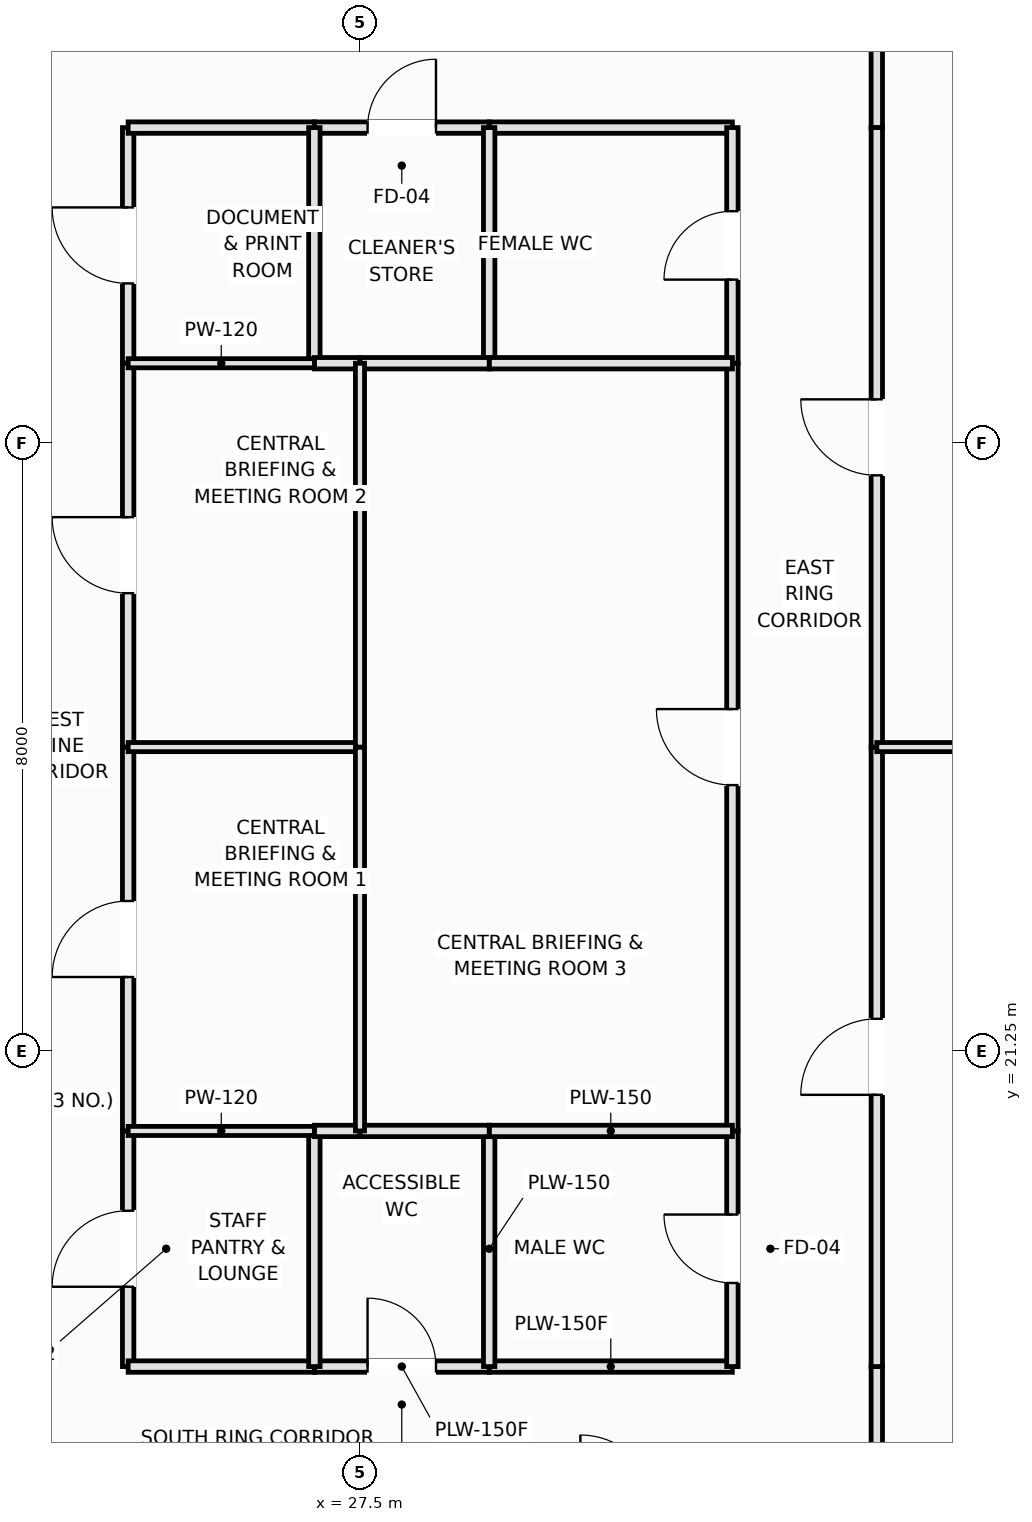
"""IFC4 building model, lengths in metres.
Left out: names, types, materials, properties, quantities, classifications, styles, units other than length and angle.
Written with IfcOpenShell. Run it as: python <this file> out.ifc"""

import sys

from ifc_helpers import new_model, si_unit, direction, frame, frame_2d, origin, place, context, subcontext, project, spatial, rectangle, extrude, element, fill, save


model = new_model("IFC4")
c1 = context("Model", 3, precision=1e-05, world=origin(), true_north=direction((0.0, 1.0)))
c2 = subcontext(c1, "Body", "Model", "MODEL_VIEW")
j1 = project(units=[si_unit("LENGTHUNIT", "METRE"), si_unit("PLANEANGLEUNIT", "RADIAN")], contexts=[c1])
p1 = place(None, origin())
s1 = spatial("IfcSite", under=j1, at=p1, CompositionType="ELEMENT")
p2 = place(p1, origin())
s2 = spatial("IfcBuilding", under=s1, at=p2, CompositionType="ELEMENT")
p3 = place(p2, frame((0.0, 0.0, 39.8)))
s3 = spatial("IfcBuildingStorey", under=s2, at=p3, CompositionType="ELEMENT", Elevation=39.8)
p4 = place(p3, frame((24.45, 17.1, 0.0), z_axis=(0.0, 0.0, 1.0), x_axis=(0.0, 1.0, 0.0)))
e1 = element("IfcWall", 1, at=p4, inside=s3, PredefinedType="PARTITIONING", context=c2, shape_type="SweptSolid", body=[
    extrude(rectangle(XDim=3.1, YDim=0.15, at=frame_2d((1.55, 0.0))), origin(), (0.0, 0.0, 1.0), 3.37),
])
p5 = place(p4, frame((1.05, 0.0, 0.0)))
e2 = element("IfcOpeningElement", 2, at=p5, cuts=e1, PredefinedType="OPENING", context=c2, shape_type="SweptSolid", body=[
    extrude(rectangle(XDim=1.0, YDim=2.15, at=frame_2d((0.5, 1.075))), frame((0.0, 0.085, 0.0), z_axis=(0.0, -1.0, 0.0), x_axis=(1.0, 0.0, 0.0)), (0.0, 0.0, 1.0), 0.17),
])
p6 = place(p3, frame((24.45, 30.3, 0.0), z_axis=(0.0, 0.0, 1.0), x_axis=(0.0, 1.0, 0.0)))
e3 = element("IfcWall", 3, at=p6, inside=s3, PredefinedType="PARTITIONING", context=c2, shape_type="SweptSolid", body=[
    extrude(rectangle(XDim=3.1, YDim=0.15, at=frame_2d((1.55, 0.0))), origin(), (0.0, 0.0, 1.0), 3.37),
])
p7 = place(p6, frame((1.05, 0.0, 0.0)))
e4 = element("IfcOpeningElement", 4, at=p7, cuts=e3, PredefinedType="OPENING", context=c2, shape_type="SweptSolid", body=[
    extrude(rectangle(XDim=1.0, YDim=2.15, at=frame_2d((0.5, 1.075))), frame((0.0, 0.085, 0.0), z_axis=(0.0, -1.0, 0.0), x_axis=(1.0, 0.0, 0.0)), (0.0, 0.0, 1.0), 0.17),
])
p8 = place(p3, frame((24.45, 20.2, 0.0), z_axis=(0.0, 0.0, 1.0), x_axis=(0.0, 1.0, 0.0)))
e5 = element("IfcWall", 5, at=p8, inside=s3, PredefinedType="PARTITIONING", context=c2, shape_type="SweptSolid", body=[
    extrude(rectangle(XDim=5.05, YDim=0.15, at=frame_2d((2.525, 0.0))), origin(), (0.0, 0.0, 1.0), 3.37),
])
p9 = place(p8, frame((2.025, 0.0, 0.0)))
e6 = element("IfcOpeningElement", 6, at=p9, cuts=e5, PredefinedType="OPENING", context=c2, shape_type="SweptSolid", body=[
    extrude(rectangle(XDim=1.0, YDim=2.15, at=frame_2d((0.5, 1.075))), frame((0.0, 0.085, 0.0), z_axis=(0.0, -1.0, 0.0), x_axis=(1.0, 0.0, 0.0)), (0.0, 0.0, 1.0), 0.17),
])
p10 = place(p3, frame((24.45, 25.25, 0.0), z_axis=(0.0, 0.0, 1.0), x_axis=(0.0, 1.0, 0.0)))
e7 = element("IfcWall", 7, at=p10, inside=s3, PredefinedType="PARTITIONING", context=c2, shape_type="SweptSolid", body=[
    extrude(rectangle(XDim=5.05, YDim=0.15, at=frame_2d((2.525, 0.0))), origin(), (0.0, 0.0, 1.0), 3.37),
])
p11 = place(p10, frame((2.025, 0.0, 0.0)))
e8 = element("IfcOpeningElement", 8, at=p11, cuts=e7, PredefinedType="OPENING", context=c2, shape_type="SweptSolid", body=[
    extrude(rectangle(XDim=1.0, YDim=2.15, at=frame_2d((0.5, 1.075))), frame((0.0, 0.085, 0.0), z_axis=(0.0, -1.0, 0.0), x_axis=(1.0, 0.0, 0.0)), (0.0, 0.0, 1.0), 0.17),
])
p12 = place(p3, frame((29.2, 17.1, 0.0), z_axis=(0.0, 0.0, 1.0), x_axis=(1.0, 0.0, 0.0)))
e9 = element("IfcWall", 9, at=p12, inside=s3, PredefinedType="PLUMBINGWALL", context=c2, shape_type="SweptSolid", body=[
    extrude(rectangle(XDim=3.2, YDim=0.15, at=frame_2d((1.6, 0.0))), origin(), (0.0, 0.0, 1.0), 3.37),
])
p13 = place(p3, frame((26.9, 17.1, 0.0), z_axis=(0.0, 0.0, 1.0), x_axis=(1.0, 0.0, 0.0)))
e10 = element("IfcWall", 10, at=p13, inside=s3, PredefinedType="PLUMBINGWALL", context=c2, shape_type="SweptSolid", body=[
    extrude(rectangle(XDim=2.3, YDim=0.15, at=frame_2d((1.15, 0.0))), origin(), (0.0, 0.0, 1.0), 3.37),
])
p14 = place(p13, frame((0.7, 0.0, 0.0)))
e11 = element("IfcOpeningElement", 11, at=p14, cuts=e10, PredefinedType="OPENING", context=c2, shape_type="SweptSolid", body=[
    extrude(rectangle(XDim=0.9, YDim=2.1, at=frame_2d((0.45, 1.05))), frame((0.0, 0.085, 0.0), z_axis=(0.0, -1.0, 0.0), x_axis=(1.0, 0.0, 0.0)), (0.0, 0.0, 1.0), 0.17),
])
p15 = place(p3, frame((24.45, 17.1, 0.0), z_axis=(0.0, 0.0, 1.0), x_axis=(1.0, 0.0, 0.0)))
e12 = element("IfcWall", 12, at=p15, inside=s3, PredefinedType="PARTITIONING", context=c2, shape_type="SweptSolid", body=[
    extrude(rectangle(XDim=2.45, YDim=0.15, at=frame_2d((1.225, 0.0))), origin(), (0.0, 0.0, 1.0), 3.37),
])
p16 = place(p3, frame((34.3, 15.2, 0.0), z_axis=(0.0, 0.0, 1.0), x_axis=(0.0, 1.0, 0.0)))
e13 = element("IfcWall", 13, at=p16, inside=s3, PredefinedType="PARTITIONING", context=c2, shape_type="SweptSolid", body=[
    extrude(rectangle(XDim=1.9, YDim=0.15, at=frame_2d((0.95, 0.0))), origin(), (0.0, 0.0, 1.0), 3.37),
])
p17 = place(p3, frame((29.2, 33.4, 0.0), z_axis=(0.0, 0.0, 1.0), x_axis=(1.0, 0.0, 0.0)))
e14 = element("IfcWall", 14, at=p17, inside=s3, PredefinedType="PLUMBINGWALL", context=c2, shape_type="SweptSolid", body=[
    extrude(rectangle(XDim=3.2, YDim=0.15, at=frame_2d((1.6, 0.0))), origin(), (0.0, 0.0, 1.0), 3.37),
])
p18 = place(p3, frame((26.9, 33.4, 0.0), z_axis=(0.0, 0.0, 1.0), x_axis=(1.0, 0.0, 0.0)))
e15 = element("IfcWall", 15, at=p18, inside=s3, PredefinedType="PLUMBINGWALL", context=c2, shape_type="SweptSolid", body=[
    extrude(rectangle(XDim=2.3, YDim=0.15, at=frame_2d((1.15, 0.0))), origin(), (0.0, 0.0, 1.0), 3.37),
])
p19 = place(p18, frame((0.7, 0.0, 0.0)))
e16 = element("IfcOpeningElement", 16, at=p19, cuts=e15, PredefinedType="OPENING", context=c2, shape_type="SweptSolid", body=[
    extrude(rectangle(XDim=0.9, YDim=2.1, at=frame_2d((0.45, 1.05))), frame((0.0, 0.085, 0.0), z_axis=(0.0, -1.0, 0.0), x_axis=(1.0, 0.0, 0.0)), (0.0, 0.0, 1.0), 0.17),
])
p20 = place(p3, frame((24.45, 33.4, 0.0), z_axis=(0.0, 0.0, 1.0), x_axis=(1.0, 0.0, 0.0)))
e17 = element("IfcWall", 17, at=p20, inside=s3, PredefinedType="PARTITIONING", context=c2, shape_type="SweptSolid", body=[
    extrude(rectangle(XDim=2.45, YDim=0.15, at=frame_2d((1.225, 0.0))), origin(), (0.0, 0.0, 1.0), 3.37),
])
p21 = place(p3, frame((34.3, 33.4, 0.0), z_axis=(0.0, 0.0, 1.0), x_axis=(0.0, 1.0, 0.0)))
e18 = element("IfcWall", 18, at=p21, inside=s3, PredefinedType="PARTITIONING", context=c2, shape_type="SweptSolid", body=[
    extrude(rectangle(XDim=1.9, YDim=0.15, at=frame_2d((0.95, 0.0))), origin(), (0.0, 0.0, 1.0), 3.37),
])
p22 = place(p3, frame((32.4, 17.1, 0.0), z_axis=(0.0, 0.0, 1.0), x_axis=(0.0, 1.0, 0.0)))
e19 = element("IfcWall", 19, at=p22, inside=s3, PredefinedType="PLUMBINGWALL", context=c2, shape_type="SweptSolid", body=[
    extrude(rectangle(XDim=3.1, YDim=0.15, at=frame_2d((1.55, 0.0))), origin(), (0.0, 0.0, 1.0), 3.37),
])
p23 = place(p22, frame((1.1, 0.0, 0.0)))
e20 = element("IfcOpeningElement", 20, at=p23, cuts=e19, PredefinedType="OPENING", context=c2, shape_type="SweptSolid", body=[
    extrude(rectangle(XDim=0.9, YDim=2.1, at=frame_2d((0.45, 1.05))), frame((0.0, 0.085, 0.0), z_axis=(0.0, -1.0, 0.0), x_axis=(1.0, 0.0, 0.0)), (0.0, 0.0, 1.0), 0.17),
])
p24 = place(p3, frame((32.4, 30.3, 0.0), z_axis=(0.0, 0.0, 1.0), x_axis=(0.0, 1.0, 0.0)))
e21 = element("IfcWall", 21, at=p24, inside=s3, PredefinedType="PLUMBINGWALL", context=c2, shape_type="SweptSolid", body=[
    extrude(rectangle(XDim=3.1, YDim=0.15, at=frame_2d((1.55, 0.0))), origin(), (0.0, 0.0, 1.0), 3.37),
])
p25 = place(p24, frame((1.1, 0.0, 0.0)))
e22 = element("IfcOpeningElement", 22, at=p25, cuts=e21, PredefinedType="OPENING", context=c2, shape_type="SweptSolid", body=[
    extrude(rectangle(XDim=0.9, YDim=2.1, at=frame_2d((0.45, 1.05))), frame((0.0, 0.085, 0.0), z_axis=(0.0, -1.0, 0.0), x_axis=(1.0, 0.0, 0.0)), (0.0, 0.0, 1.0), 0.17),
])
p26 = place(p3, frame((32.4, 20.2, 0.0), z_axis=(0.0, 0.0, 1.0), x_axis=(0.0, 1.0, 0.0)))
e23 = element("IfcWall", 23, at=p26, inside=s3, PredefinedType="PARTITIONING", context=c2, shape_type="SweptSolid", body=[
    extrude(rectangle(XDim=10.1, YDim=0.15, at=frame_2d((5.05, 0.0))), origin(), (0.0, 0.0, 1.0), 3.37),
])
p27 = place(p26, frame((4.55, 0.0, 0.0)))
e24 = element("IfcOpeningElement", 24, at=p27, cuts=e23, PredefinedType="OPENING", context=c2, shape_type="SweptSolid", body=[
    extrude(rectangle(XDim=1.0, YDim=2.15, at=frame_2d((0.5, 1.075))), frame((0.0, 0.085, 0.0), z_axis=(0.0, -1.0, 0.0), x_axis=(1.0, 0.0, 0.0)), (0.0, 0.0, 1.0), 0.17),
])
p28 = place(p3, frame((34.3, 17.1, 0.0), z_axis=(0.0, 0.0, 1.0), x_axis=(0.0, 1.0, 0.0)))
e25 = element("IfcWall", 25, at=p28, inside=s3, PredefinedType="PARTITIONING", context=c2, shape_type="SweptSolid", body=[
    extrude(rectangle(XDim=8.15, YDim=0.15, at=frame_2d((4.075, 0.0))), origin(), (0.0, 0.0, 1.0), 3.37),
])
p29 = place(p28, frame((3.575, 0.0, 0.0)))
e26 = element("IfcOpeningElement", 26, at=p29, cuts=e25, PredefinedType="OPENING", context=c2, shape_type="SweptSolid", body=[
    extrude(rectangle(XDim=1.0, YDim=2.15, at=frame_2d((0.5, 1.075))), frame((0.0, 0.085, 0.0), z_axis=(0.0, -1.0, 0.0), x_axis=(1.0, 0.0, 0.0)), (0.0, 0.0, 1.0), 0.17),
])
p30 = place(p3, frame((34.3, 25.25, 0.0), z_axis=(0.0, 0.0, 1.0), x_axis=(0.0, 1.0, 0.0)))
e27 = element("IfcWall", 27, at=p30, inside=s3, PredefinedType="PARTITIONING", context=c2, shape_type="SweptSolid", body=[
    extrude(rectangle(XDim=8.15, YDim=0.15, at=frame_2d((4.075, 0.0))), origin(), (0.0, 0.0, 1.0), 3.37),
])
p31 = place(p30, frame((3.575, 0.0, 0.0)))
e28 = element("IfcOpeningElement", 28, at=p31, cuts=e27, PredefinedType="OPENING", context=c2, shape_type="SweptSolid", body=[
    extrude(rectangle(XDim=1.0, YDim=2.15, at=frame_2d((0.5, 1.075))), frame((0.0, 0.085, 0.0), z_axis=(0.0, -1.0, 0.0), x_axis=(1.0, 0.0, 0.0)), (0.0, 0.0, 1.0), 0.17),
])
p32 = place(p3, frame((29.2, 17.1, 0.0), z_axis=(0.0, 0.0, 1.0), x_axis=(0.0, 1.0, 0.0)))
e29 = element("IfcWall", 29, at=p32, inside=s3, PredefinedType="PLUMBINGWALL", context=c2, shape_type="SweptSolid", body=[
    extrude(rectangle(XDim=3.1, YDim=0.15, at=frame_2d((1.55, 0.0))), origin(), (0.0, 0.0, 1.0), 3.37),
])
p33 = place(p3, frame((29.2, 20.2, 0.0), z_axis=(0.0, 0.0, 1.0), x_axis=(1.0, 0.0, 0.0)))
e30 = element("IfcWall", 30, at=p33, inside=s3, PredefinedType="PLUMBINGWALL", context=c2, shape_type="SweptSolid", body=[
    extrude(rectangle(XDim=3.2, YDim=0.15, at=frame_2d((1.6, 0.0))), origin(), (0.0, 0.0, 1.0), 3.37),
])
p34 = place(p3, frame((29.2, 30.3, 0.0), z_axis=(0.0, 0.0, 1.0), x_axis=(0.0, 1.0, 0.0)))
e31 = element("IfcWall", 31, at=p34, inside=s3, PredefinedType="PLUMBINGWALL", context=c2, shape_type="SweptSolid", body=[
    extrude(rectangle(XDim=3.1, YDim=0.15, at=frame_2d((1.55, 0.0))), origin(), (0.0, 0.0, 1.0), 3.37),
])
p35 = place(p3, frame((29.2, 30.3, 0.0), z_axis=(0.0, 0.0, 1.0), x_axis=(1.0, 0.0, 0.0)))
e32 = element("IfcWall", 32, at=p35, inside=s3, PredefinedType="PLUMBINGWALL", context=c2, shape_type="SweptSolid", body=[
    extrude(rectangle(XDim=3.2, YDim=0.15, at=frame_2d((1.6, 0.0))), origin(), (0.0, 0.0, 1.0), 3.37),
])
p36 = place(p3, frame((26.9, 17.1, 0.0), z_axis=(0.0, 0.0, 1.0), x_axis=(0.0, 1.0, 0.0)))
e33 = element("IfcWall", 33, at=p36, inside=s3, PredefinedType="PLUMBINGWALL", context=c2, shape_type="SweptSolid", body=[
    extrude(rectangle(XDim=3.1, YDim=0.15, at=frame_2d((1.55, 0.0))), origin(), (0.0, 0.0, 1.0), 3.37),
])
p37 = place(p3, frame((26.9, 20.2, 0.0), z_axis=(0.0, 0.0, 1.0), x_axis=(1.0, 0.0, 0.0)))
e34 = element("IfcWall", 34, at=p37, inside=s3, PredefinedType="PLUMBINGWALL", context=c2, shape_type="SweptSolid", body=[
    extrude(rectangle(XDim=0.6, YDim=0.15, at=frame_2d((0.3, 0.0))), origin(), (0.0, 0.0, 1.0), 3.37),
])
p38 = place(p3, frame((27.5, 20.2, 0.0), z_axis=(0.0, 0.0, 1.0), x_axis=(1.0, 0.0, 0.0)))
e35 = element("IfcWall", 35, at=p38, inside=s3, PredefinedType="PLUMBINGWALL", context=c2, shape_type="SweptSolid", body=[
    extrude(rectangle(XDim=1.7, YDim=0.15, at=frame_2d((0.85, 0.0))), origin(), (0.0, 0.0, 1.0), 3.37),
])
p39 = place(p3, frame((26.9, 30.3, 0.0), z_axis=(0.0, 0.0, 1.0), x_axis=(0.0, 1.0, 0.0)))
e36 = element("IfcWall", 36, at=p39, inside=s3, PredefinedType="PLUMBINGWALL", context=c2, shape_type="SweptSolid", body=[
    extrude(rectangle(XDim=3.1, YDim=0.15, at=frame_2d((1.55, 0.0))), origin(), (0.0, 0.0, 1.0), 3.37),
])
p40 = place(p3, frame((26.9, 30.3, 0.0), z_axis=(0.0, 0.0, 1.0), x_axis=(1.0, 0.0, 0.0)))
e37 = element("IfcWall", 37, at=p40, inside=s3, PredefinedType="PLUMBINGWALL", context=c2, shape_type="SweptSolid", body=[
    extrude(rectangle(XDim=0.6, YDim=0.15, at=frame_2d((0.3, 0.0))), origin(), (0.0, 0.0, 1.0), 3.37),
])
p41 = place(p3, frame((27.5, 30.3, 0.0), z_axis=(0.0, 0.0, 1.0), x_axis=(1.0, 0.0, 0.0)))
e38 = element("IfcWall", 38, at=p41, inside=s3, PredefinedType="PLUMBINGWALL", context=c2, shape_type="SweptSolid", body=[
    extrude(rectangle(XDim=1.7, YDim=0.15, at=frame_2d((0.85, 0.0))), origin(), (0.0, 0.0, 1.0), 3.37),
])
for number, where, z_axis, x_axis in (
    (39, (24.45, 20.2, 0.0), (0.0, 0.0, 1.0), (1.0, 0.0, 0.0)),
    (40, (24.45, 30.3, 0.0), (0.0, 0.0, 1.0), (1.0, 0.0, 0.0)),
):
    element("IfcWall", number, at=place(p3, frame(where, z_axis=z_axis, x_axis=x_axis)), inside=s3, PredefinedType="PARTITIONING", context=c2, shape_type="SweptSolid", body=[
        extrude(rectangle(XDim=2.45, YDim=0.12, at=frame_2d((1.225, 0.0))), origin(), (0.0, 0.0, 1.0), 3.37),
    ])
p42 = place(p3, frame((24.45, 25.25, 0.0), z_axis=(0.0, 0.0, 1.0), x_axis=(1.0, 0.0, 0.0)))
e41 = element("IfcWall", 41, at=p42, inside=s3, PredefinedType="PARTITIONING", context=c2, shape_type="SweptSolid", body=[
    extrude(rectangle(XDim=3.05, YDim=0.12, at=frame_2d((1.525, 0.0))), origin(), (0.0, 0.0, 1.0), 2.72),
])
for number, where, z_axis, x_axis in (
    (42, (27.5, 20.2, 0.0), (0.0, 0.0, 1.0), (0.0, 1.0, 0.0)),
    (43, (27.5, 25.25, 0.0), (0.0, 0.0, 1.0), (0.0, 1.0, 0.0)),
):
    element("IfcWall", number, at=place(p3, frame(where, z_axis=z_axis, x_axis=x_axis)), inside=s3, PredefinedType="PARTITIONING", context=c2, shape_type="SweptSolid", body=[
        extrude(rectangle(XDim=5.05, YDim=0.12, at=frame_2d((2.525, 0.0))), origin(), (0.0, 0.0, 1.0), 3.37),
    ])
p43 = place(p3, frame((34.3, 25.25, 0.0), z_axis=(0.0, 0.0, 1.0), x_axis=(1.0, 0.0, 0.0)))
e44 = element("IfcWall", 44, at=p43, inside=s3, PredefinedType="PARTITIONING", context=c2, shape_type="SweptSolid", body=[
    extrude(rectangle(XDim=19.19, YDim=0.12, at=frame_2d((9.595, 0.0))), origin(), (0.0, 0.0, 1.0), 2.72),
])
p44 = place(p5, origin())
e45 = element("IfcDoor", 45, at=p44, inside=s3, OperationType="SINGLE_SWING_LEFT", PredefinedType="DOOR", context=c2, shape_type="SweptSolid", body=[
    extrude(rectangle(XDim=1.0, YDim=2.15, at=frame_2d((0.5, 1.075))), frame((0.0, 0.025, 0.0), z_axis=(0.0, -1.0, 0.0), x_axis=(1.0, 0.0, 0.0)), (0.0, 0.0, 1.0), 0.05),
])
fill(e2, e45)
p45 = place(p7, origin())
e46 = element("IfcDoor", 46, at=p45, inside=s3, OperationType="SINGLE_SWING_RIGHT", PredefinedType="DOOR", context=c2, shape_type="SweptSolid", body=[
    extrude(rectangle(XDim=1.0, YDim=2.15, at=frame_2d((0.5, 1.075))), frame((0.0, 0.025, 0.0), z_axis=(0.0, -1.0, 0.0), x_axis=(1.0, 0.0, 0.0)), (0.0, 0.0, 1.0), 0.05),
])
fill(e4, e46)
p46 = place(p9, origin())
e47 = element("IfcDoor", 47, at=p46, inside=s3, OperationType="SINGLE_SWING_LEFT", PredefinedType="DOOR", context=c2, shape_type="SweptSolid", body=[
    extrude(rectangle(XDim=1.0, YDim=2.15, at=frame_2d((0.5, 1.075))), frame((0.0, 0.025, 0.0), z_axis=(0.0, -1.0, 0.0), x_axis=(1.0, 0.0, 0.0)), (0.0, 0.0, 1.0), 0.05),
])
fill(e6, e47)
p47 = place(p11, origin())
e48 = element("IfcDoor", 48, at=p47, inside=s3, OperationType="SINGLE_SWING_RIGHT", PredefinedType="DOOR", context=c2, shape_type="SweptSolid", body=[
    extrude(rectangle(XDim=1.0, YDim=2.15, at=frame_2d((0.5, 1.075))), frame((0.0, 0.025, 0.0), z_axis=(0.0, -1.0, 0.0), x_axis=(1.0, 0.0, 0.0)), (0.0, 0.0, 1.0), 0.05),
])
fill(e8, e48)
p48 = place(p14, origin())
e49 = element("IfcDoor", 49, at=p48, inside=s3, OperationType="SINGLE_SWING_LEFT", PredefinedType="DOOR", context=c2, shape_type="SweptSolid", body=[
    extrude(rectangle(XDim=0.9, YDim=2.1, at=frame_2d((0.45, 1.05))), frame((0.0, 0.025, 0.0), z_axis=(0.0, -1.0, 0.0), x_axis=(1.0, 0.0, 0.0)), (0.0, 0.0, 1.0), 0.05),
])
fill(e11, e49)
p49 = place(p19, origin())
e50 = element("IfcDoor", 50, at=p49, inside=s3, OperationType="SINGLE_SWING_RIGHT", PredefinedType="DOOR", context=c2, shape_type="SweptSolid", body=[
    extrude(rectangle(XDim=0.9, YDim=2.1, at=frame_2d((0.45, 1.05))), frame((0.0, 0.025, 0.0), z_axis=(0.0, -1.0, 0.0), x_axis=(1.0, 0.0, 0.0)), (0.0, 0.0, 1.0), 0.05),
])
fill(e16, e50)
p50 = place(p23, origin())
e51 = element("IfcDoor", 51, at=p50, inside=s3, OperationType="SINGLE_SWING_RIGHT", PredefinedType="DOOR", context=c2, shape_type="SweptSolid", body=[
    extrude(rectangle(XDim=0.9, YDim=2.1, at=frame_2d((0.45, 1.05))), frame((0.0, 0.025, 0.0), z_axis=(0.0, -1.0, 0.0), x_axis=(1.0, 0.0, 0.0)), (0.0, 0.0, 1.0), 0.05),
])
fill(e20, e51)
p51 = place(p25, origin())
e52 = element("IfcDoor", 52, at=p51, inside=s3, OperationType="SINGLE_SWING_LEFT", PredefinedType="DOOR", context=c2, shape_type="SweptSolid", body=[
    extrude(rectangle(XDim=0.9, YDim=2.1, at=frame_2d((0.45, 1.05))), frame((0.0, 0.025, 0.0), z_axis=(0.0, -1.0, 0.0), x_axis=(1.0, 0.0, 0.0)), (0.0, 0.0, 1.0), 0.05),
])
fill(e22, e52)
p52 = place(p27, origin())
e53 = element("IfcDoor", 53, at=p52, inside=s3, OperationType="SINGLE_SWING_RIGHT", PredefinedType="DOOR", context=c2, shape_type="SweptSolid", body=[
    extrude(rectangle(XDim=1.0, YDim=2.15, at=frame_2d((0.5, 1.075))), frame((0.0, 0.025, 0.0), z_axis=(0.0, -1.0, 0.0), x_axis=(1.0, 0.0, 0.0)), (0.0, 0.0, 1.0), 0.05),
])
fill(e24, e53)
p53 = place(p29, origin())
e54 = element("IfcDoor", 54, at=p53, inside=s3, OperationType="SINGLE_SWING_LEFT", PredefinedType="DOOR", context=c2, shape_type="SweptSolid", body=[
    extrude(rectangle(XDim=1.0, YDim=2.15, at=frame_2d((0.5, 1.075))), frame((0.0, 0.025, 0.0), z_axis=(0.0, -1.0, 0.0), x_axis=(1.0, 0.0, 0.0)), (0.0, 0.0, 1.0), 0.05),
])
fill(e26, e54)
p54 = place(p31, origin())
e55 = element("IfcDoor", 55, at=p54, inside=s3, OperationType="SINGLE_SWING_RIGHT", PredefinedType="DOOR", context=c2, shape_type="SweptSolid", body=[
    extrude(rectangle(XDim=1.0, YDim=2.15, at=frame_2d((0.5, 1.075))), frame((0.0, 0.025, 0.0), z_axis=(0.0, -1.0, 0.0), x_axis=(1.0, 0.0, 0.0)), (0.0, 0.0, 1.0), 0.05),
])
fill(e28, e55)
save(model, sys.argv[1])
